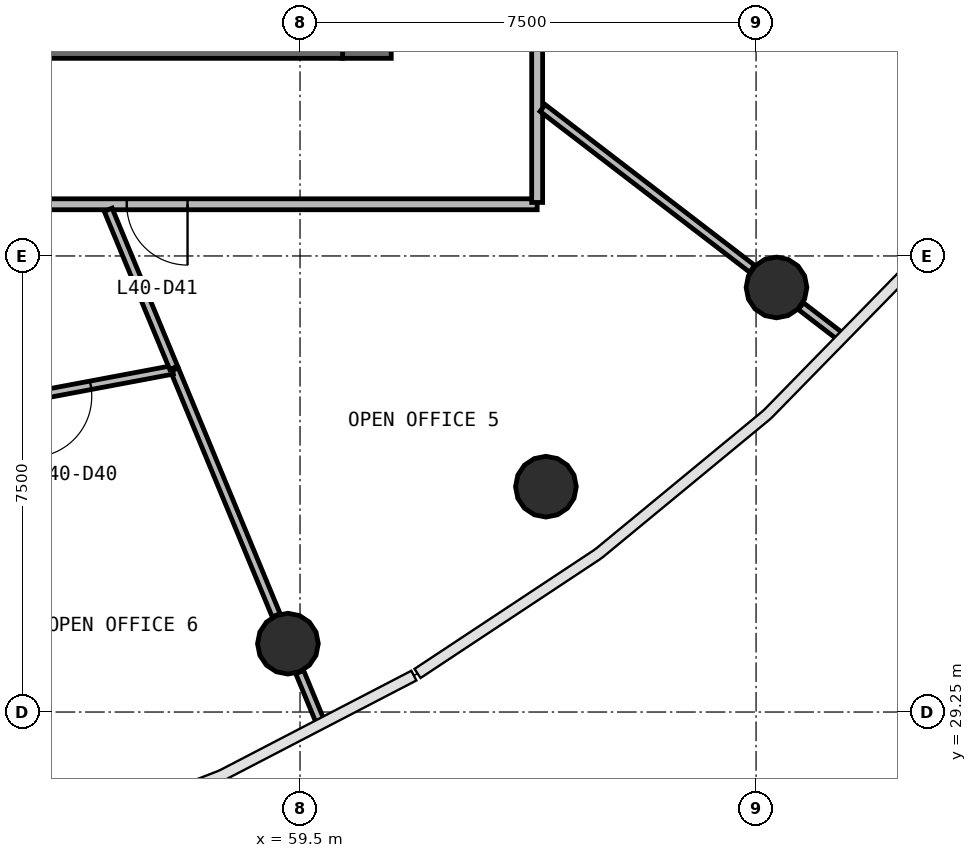
"""IFC4 building model, lengths in metres.
Left out: names, types, materials, properties, quantities, classifications, styles, units other than length and angle.
Written with IfcOpenShell. Run it as: python <this file> out.ifc"""

import sys

from ifc_helpers import new_model, si_unit, direction, frame, frame_2d, origin, origin_2d, place, context, subcontext, project, spatial, rectangle, circle, extrude, source, transform, mapped, element, fill, save


model = new_model("IFC4")
c1 = context("Model", 3, precision=1e-05, world=origin(), true_north=direction((0.0, 1.0)))
c2 = subcontext(c1, "Body", "Model", "MODEL_VIEW")
j1 = project(units=[si_unit("LENGTHUNIT", "METRE"), si_unit("PLANEANGLEUNIT", "RADIAN")], contexts=[c1])
p1 = place(None, origin())
s1 = spatial("IfcSite", under=j1, at=p1, CompositionType="ELEMENT")
p2 = place(p1, origin())
s2 = spatial("IfcBuilding", under=s1, at=p2, CompositionType="ELEMENT")
p3 = place(p2, frame((0.0, 0.0, 168.2)))
s3 = spatial("IfcBuildingStorey", under=s2, at=p3, CompositionType="ELEMENT", Elevation=168.2)
p4 = place(p3, frame((60.6, 40.0, 0.0), z_axis=(0.0, 0.0, 1.0), x_axis=(0.0, 1.0, 0.0)))
e1 = element("IfcWall", 1, at=p4, inside=s3, PredefinedType="SHEAR", context=c2, shape_type="SweptSolid", body=[
    extrude(rectangle(XDim=16.0, YDim=0.8, at=frame_2d((8.0, 0.0))), origin(), (0.0, 0.0, 1.0), 3.9),
])
p5 = place(p4, frame((7.1, 0.0, 0.0)))
e2 = element("IfcOpeningElement", 2, at=p5, cuts=e1, PredefinedType="OPENING", context=c2, shape_type="SweptSolid", body=[
    extrude(rectangle(XDim=1.8, YDim=2.1, at=frame_2d((0.9, 1.05))), frame((0.0, 0.41, 0.0), z_axis=(0.0, -1.0, 0.0), x_axis=(1.0, 0.0, 0.0)), (0.0, 0.0, 1.0), 0.82),
])
p6 = place(p3, frame((43.8, 40.4, 0.0), z_axis=(0.0, 0.0, 1.0), x_axis=(1.0, 0.0, 0.0)))
e3 = element("IfcWall", 3, at=p6, inside=s3, PredefinedType="SHEAR", context=c2, shape_type="SweptSolid", body=[
    extrude(rectangle(XDim=16.4, YDim=0.8, at=frame_2d((8.2, 0.0))), origin(), (0.0, 0.0, 1.0), 3.9),
])
p7 = place(p6, frame((10.1, 0.0, 0.0)))
e4 = element("IfcOpeningElement", 4, at=p7, cuts=e3, PredefinedType="OPENING", context=c2, shape_type="SweptSolid", body=[
    extrude(rectangle(XDim=1.2, YDim=2.1, at=frame_2d((0.6, 1.05))), frame((0.0, 0.41, 0.0), z_axis=(0.0, -1.0, 0.0), x_axis=(1.0, 0.0, 0.0)), (0.0, 0.0, 1.0), 0.82),
])
p8 = place(p6, frame((7.05, 0.0, 0.0)))
e5 = element("IfcOpeningElement", 5, at=p8, cuts=e3, PredefinedType="OPENING", context=c2, shape_type="SweptSolid", body=[
    extrude(rectangle(XDim=1.1, YDim=2.1, at=frame_2d((0.55, 1.05))), frame((0.0, 0.41, 0.0), z_axis=(0.0, -1.0, 0.0), x_axis=(1.0, 0.0, 0.0)), (0.0, 0.0, 1.0), 0.82),
])
p9 = place(p6, frame((0.5, 0.0, 0.0)))
e6 = element("IfcOpeningElement", 6, at=p9, cuts=e3, PredefinedType="OPENING", context=c2, shape_type="SweptSolid", body=[
    extrude(rectangle(XDim=0.8, YDim=2.1, at=frame_2d((0.4, 1.05))), frame((0.0, 0.41, 0.0), z_axis=(0.0, -1.0, 0.0), x_axis=(1.0, 0.0, 0.0)), (0.0, 0.0, 1.0), 0.82),
])
m1 = source(origin(), c2, "Body", "SweptSolid", [
    extrude(circle(Radius=0.5, at=origin_2d()), origin(), (0.0, 0.0, 1.0), 3.9),
])
for number, where, z_axis, x_axis in (
    (7, (59.301, 30.374, 0.0), (0.0, 0.0, 1.0), (1.0, 0.0, 0.0)),
    (8, (63.544, 32.956, 0.0), (0.0, 0.0, 1.0), (1.0, 0.0, 0.0)),
    (9, (67.336, 36.232, 0.0), (0.0, 0.0, 1.0), (1.0, 0.0, 0.0)),
):
    element("IfcColumn", number, at=place(p3, frame(where, z_axis=z_axis, x_axis=x_axis)), inside=s3, PredefinedType="COLUMN", context=c2, shape_type="MappedRepresentation", body=[
        mapped(m1, transform((0.0, 0.0, 0.0), scale=1.0)),
    ])
p10 = place(p3, frame((63.4, 37.6, 0.0), z_axis=(0.0, 0.0, 1.0), x_axis=(-1.0, 0.0, 0.0)))
e10 = element("IfcWall", 10, at=p10, inside=s3, PredefinedType="PARTITIONING", context=c2, shape_type="SweptSolid", body=[
    extrude(rectangle(XDim=22.8, YDim=0.18, at=frame_2d((11.4, 0.0))), origin(), (0.0, 0.0, 1.0), 2.88),
])
p11 = place(p10, frame((12.95, 0.0, 0.0)))
e11 = element("IfcOpeningElement", 11, at=p11, cuts=e10, PredefinedType="OPENING", context=c2, shape_type="SweptSolid", body=[
    extrude(rectangle(XDim=1.0, YDim=2.1, at=frame_2d((0.5, 1.05))), frame((0.0, 0.1, 0.0), z_axis=(0.0, -1.0, 0.0), x_axis=(1.0, 0.0, 0.0)), (0.0, 0.0, 1.0), 0.2),
])
p12 = place(p10, frame((10.95, 0.0, 0.0)))
e12 = element("IfcOpeningElement", 12, at=p12, cuts=e10, PredefinedType="OPENING", context=c2, shape_type="SweptSolid", body=[
    extrude(rectangle(XDim=1.0, YDim=2.1, at=frame_2d((0.5, 1.05))), frame((0.0, 0.1, 0.0), z_axis=(0.0, -1.0, 0.0), x_axis=(1.0, 0.0, 0.0)), (0.0, 0.0, 1.0), 0.2),
])
p13 = place(p10, frame((5.75, 0.0, 0.0)))
e13 = element("IfcOpeningElement", 13, at=p13, cuts=e10, PredefinedType="OPENING", context=c2, shape_type="SweptSolid", body=[
    extrude(rectangle(XDim=1.0, YDim=2.1, at=frame_2d((0.5, 1.05))), frame((0.0, 0.1, 0.0), z_axis=(0.0, -1.0, 0.0), x_axis=(1.0, 0.0, 0.0)), (0.0, 0.0, 1.0), 0.2),
])
p14 = place(p3, frame((63.4, 58.37, 0.0), z_axis=(0.0, 0.0, 1.0), x_axis=(0.0, -1.0, 0.0)))
e14 = element("IfcWall", 14, at=p14, inside=s3, PredefinedType="PARTITIONING", context=c2, shape_type="SweptSolid", body=[
    extrude(rectangle(XDim=20.74, YDim=0.18, at=frame_2d((10.37, 0.0))), origin(), (0.0, 0.0, 1.0), 2.88),
])
p15 = place(p14, frame((12.09, 0.0, 0.0)))
e15 = element("IfcOpeningElement", 15, at=p15, cuts=e14, PredefinedType="OPENING", context=c2, shape_type="SweptSolid", body=[
    extrude(rectangle(XDim=1.0, YDim=2.1, at=frame_2d((0.5, 1.05))), frame((0.0, 0.1, 0.0), z_axis=(0.0, -1.0, 0.0), x_axis=(1.0, 0.0, 0.0)), (0.0, 0.0, 1.0), 0.2),
])
p16 = place(p14, frame((9.89, 0.0, 0.0)))
e16 = element("IfcOpeningElement", 16, at=p16, cuts=e14, PredefinedType="OPENING", context=c2, shape_type="SweptSolid", body=[
    extrude(rectangle(XDim=1.0, YDim=2.1, at=frame_2d((0.5, 1.05))), frame((0.0, 0.1, 0.0), z_axis=(0.0, -1.0, 0.0), x_axis=(1.0, 0.0, 0.0)), (0.0, 0.0, 1.0), 0.2),
])
p17 = place(p3, frame((63.49, 39.183, 0.0), z_axis=(0.0, 0.0, 1.0), x_axis=(0.793348465904, -0.608767781382, 0.0)))
e17 = element("IfcWall", 17, at=p17, inside=s3, PredefinedType="PARTITIONING", context=c2, shape_type="SweptSolid", body=[
    extrude(rectangle(XDim=4.344, YDim=0.14, at=frame_2d((2.172, 0.0))), origin(), (0.0, 0.0, 1.0), 2.88),
])
p18 = place(p3, frame((57.434, 34.882, 0.0), z_axis=(0.0, 0.0, 1.0), x_axis=(0.382688609924, -0.923877387879, 0.0)))
e18 = element("IfcWall", 18, at=p18, inside=s3, PredefinedType="PARTITIONING", context=c2, shape_type="SweptSolid", body=[
    extrude(rectangle(XDim=4.375, YDim=0.14, at=frame_2d((2.187, 0.0))), origin(), (0.0, 0.0, 1.0), 2.88),
])
p19 = place(p3, frame((57.404, 34.877, 0.0), z_axis=(0.0, 0.0, 1.0), x_axis=(-0.982769740803, -0.184834078464, 0.0)))
e19 = element("IfcWall", 19, at=p19, inside=s3, PredefinedType="PARTITIONING", context=c2, shape_type="SweptSolid", body=[
    extrude(rectangle(XDim=3.621, YDim=0.14, at=frame_2d((1.81, 0.0))), origin(), (0.0, 0.0, 1.0), 2.88),
])
p20 = place(p19, frame((1.371, 0.0, 0.0)))
e20 = element("IfcOpeningElement", 20, at=p20, cuts=e19, PredefinedType="OPENING", context=c2, shape_type="SweptSolid", body=[
    extrude(rectangle(XDim=1.0, YDim=2.1, at=frame_2d((0.5, 1.05))), frame((0.0, 0.08, 0.0), z_axis=(0.0, -1.0, 0.0), x_axis=(1.0, 0.0, 0.0)), (0.0, 0.0, 1.0), 0.16),
])
p21 = place(p3, frame((56.345, 37.51, 0.0), z_axis=(0.0, 0.0, 1.0), x_axis=(0.382655706448, -0.923891016475, 0.0)))
e21 = element("IfcWall", 21, at=p21, inside=s3, PredefinedType="PARTITIONING", context=c2, shape_type="SweptSolid", body=[
    extrude(rectangle(XDim=2.814, YDim=0.14, at=frame_2d((1.407, 0.0))), origin(), (0.0, 0.0, 1.0), 2.88),
])
p22 = place(p3, frame((59.494, 29.908, 0.0), z_axis=(0.0, 0.0, 1.0), x_axis=(0.382636339827, -0.923899037473, 0.0)))
e22 = element("IfcWall", 22, at=p22, inside=s3, PredefinedType="PARTITIONING", context=c2, shape_type="SweptSolid", body=[
    extrude(rectangle(XDim=0.859, YDim=0.14, at=frame_2d((0.429, 0.0))), origin(), (0.0, 0.0, 1.0), 2.88),
])
p23 = place(p3, frame((67.737, 35.925, 0.0), z_axis=(0.0, 0.0, 1.0), x_axis=(0.79338870093, -0.608715343355, 0.0)))
e23 = element("IfcWall", 23, at=p23, inside=s3, PredefinedType="PARTITIONING", context=c2, shape_type="SweptSolid", body=[
    extrude(rectangle(XDim=0.794, YDim=0.14, at=frame_2d((0.397, 0.0))), origin(), (0.0, 0.0, 1.0), 2.88),
])
m2 = source(origin(), c2, "Body", "SweptSolid", [
    extrude(rectangle(XDim=1.0, YDim=2.1, at=frame_2d((0.5, 1.05))), frame((0.0, 0.025, 0.0), z_axis=(0.0, -1.0, 0.0), x_axis=(1.0, 0.0, 0.0)), (0.0, 0.0, 1.0), 0.05),
])
p24 = place(p20, origin())
e24 = element("IfcDoor", 24, at=p24, inside=s3, OperationType="SINGLE_SWING_RIGHT", PredefinedType="DOOR", context=c2, shape_type="MappedRepresentation", body=[
    mapped(m2, transform((0.0, 0.0, 0.0), scale=1.0)),
])
fill(e20, e24)
p25 = place(p13, origin())
e25 = element("IfcDoor", 25, at=p25, inside=s3, OperationType="SINGLE_SWING_LEFT", PredefinedType="DOOR", context=c2, shape_type="MappedRepresentation", body=[
    mapped(m2, transform((0.0, 0.0, 0.0), scale=1.0)),
])
fill(e13, e25)
save(model, sys.argv[1])
